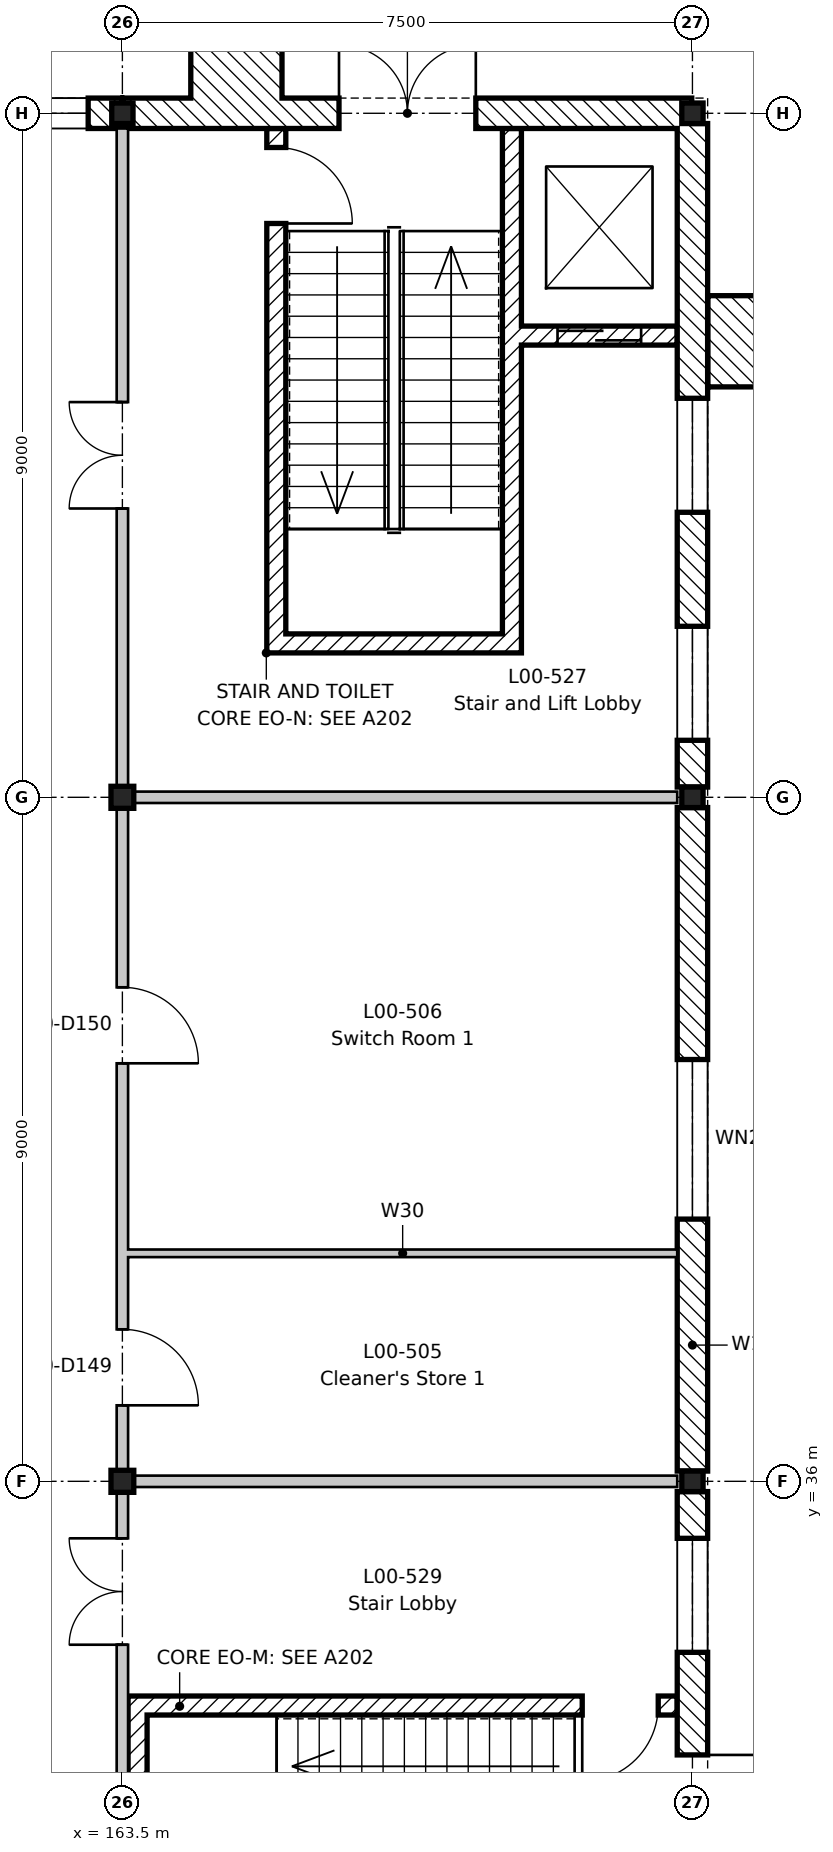
"""IFC4 building model, lengths in metres.
Left out: names, types, materials, properties, quantities, classifications, styles, units other than length and angle.
Written with IfcOpenShell. Run it as: python <this file> out.ifc"""

import sys

from ifc_helpers import new_model, si_unit, direction, frame, frame_2d, origin, origin_2d, place, context, subcontext, project, spatial, rectangle, i_section, extrude, element, fill, save


model = new_model("IFC4")
c1 = context("Model", 3, precision=1e-05, world=origin(), true_north=direction((0.0, 1.0)))
c2 = subcontext(c1, "Body", "Model", "MODEL_VIEW")
j1 = project(units=[si_unit("LENGTHUNIT", "METRE"), si_unit("PLANEANGLEUNIT", "RADIAN")], contexts=[c1])
p1 = place(None, origin())
s1 = spatial("IfcSite", under=j1, at=p1, CompositionType="ELEMENT")
p2 = place(p1, origin())
s2 = spatial("IfcBuilding", under=s1, at=p2, CompositionType="ELEMENT")
p3 = place(p2, origin())
s3 = spatial("IfcBuildingStorey", under=s2, at=p3, CompositionType="ELEMENT", Elevation=0.0)
for number, where, z_axis, x_axis in (
    (1, (163.5, 36.0, -0.6), (0.0, 0.0, 1.0), (1.0, 0.0, 0.0)),
    (2, (163.5, 45.0, -0.6), (0.0, 0.0, 1.0), (1.0, 0.0, 0.0)),
):
    element("IfcColumn", number, at=place(p3, frame(where, z_axis=z_axis, x_axis=x_axis)), inside=s3, PredefinedType="COLUMN", context=c2, shape_type="SweptSolid", body=[
        extrude(i_section(OverallWidth=0.3, OverallDepth=0.29, WebThickness=0.009, FlangeThickness=0.014, FilletRadius=0.027, at=origin_2d()), origin(), (0.0, 0.0, 1.0), 5.8),
    ])
for number, where, z_axis, x_axis in (
    (3, (163.5, 54.0, -0.6), (0.0, 0.0, 1.0), (1.0, 0.0, 0.0)),
    (4, (171.0, 36.0, -0.6), (0.0, 0.0, 1.0), (1.0, 0.0, 0.0)),
    (5, (171.0, 45.0, -0.6), (0.0, 0.0, 1.0), (1.0, 0.0, 0.0)),
    (6, (171.0, 54.0, -0.6), (0.0, 0.0, 1.0), (1.0, 0.0, 0.0)),
):
    element("IfcColumn", number, at=place(p3, frame(where, z_axis=z_axis, x_axis=x_axis)), inside=s3, PredefinedType="COLUMN", context=c2, shape_type="SweptSolid", body=[
        extrude(i_section(OverallWidth=0.28, OverallDepth=0.27, WebThickness=0.008, FlangeThickness=0.013, FilletRadius=0.024, at=origin_2d()), origin(), (0.0, 0.0, 1.0), 5.8),
    ])
p4 = place(p3, frame((168.625, 46.9, 0.0), z_axis=(0.0, 0.0, 1.0), x_axis=(0.0, 1.0, 0.0)))
e7 = element("IfcWall", 7, at=p4, inside=s3, PredefinedType="SHEAR", context=c2, shape_type="SweptSolid", body=[
    extrude(rectangle(XDim=6.9, YDim=0.25, at=frame_2d((3.45, 0.0))), origin(), (0.0, 0.0, 1.0), 5.2),
])
p5 = place(p3, frame((165.525, 46.9, 0.0), z_axis=(0.0, 0.0, 1.0), x_axis=(0.0, 1.0, 0.0)))
e8 = element("IfcWall", 8, at=p5, inside=s3, PredefinedType="SHEAR", context=c2, shape_type="SweptSolid", body=[
    extrude(rectangle(XDim=6.9, YDim=0.25, at=frame_2d((3.45, 0.0))), origin(), (0.0, 0.0, 1.0), 5.2),
])
p6 = place(p5, frame((5.65, 0.0, 0.0)))
e9 = element("IfcOpeningElement", 9, at=p6, cuts=e8, PredefinedType="OPENING", context=c2, shape_type="SweptSolid", body=[
    extrude(rectangle(XDim=1.0, YDim=2.1, at=frame_2d((0.5, 1.05))), frame((0.0, 0.135, 0.0), z_axis=(0.0, -1.0, 0.0), x_axis=(1.0, 0.0, 0.0)), (0.0, 0.0, 1.0), 0.27),
])
p7 = place(p3, frame((165.65, 47.025, 0.0), z_axis=(0.0, 0.0, 1.0), x_axis=(1.0, 0.0, 0.0)))
e10 = element("IfcWall", 10, at=p7, inside=s3, PredefinedType="SHEAR", context=c2, shape_type="SweptSolid", body=[
    extrude(rectangle(XDim=2.85, YDim=0.25, at=frame_2d((1.425, 0.0))), origin(), (0.0, 0.0, 1.0), 5.2),
])
p8 = place(p3, frame((168.75, 51.075, 0.0), z_axis=(0.0, 0.0, 1.0), x_axis=(1.0, 0.0, 0.0)))
e11 = element("IfcWall", 11, at=p8, inside=s3, PredefinedType="SHEAR", context=c2, shape_type="SweptSolid", body=[
    extrude(rectangle(XDim=2.05, YDim=0.25, at=frame_2d((1.025, 0.0))), origin(), (0.0, 0.0, 1.0), 5.2),
])
p9 = place(p8, frame((0.475, 0.0, 0.0)))
e12 = element("IfcOpeningElement", 12, at=p9, cuts=e11, PredefinedType="OPENING", context=c2, shape_type="SweptSolid", body=[
    extrude(rectangle(XDim=1.1, YDim=2.1, at=frame_2d((0.55, 1.05))), frame((0.0, 0.135, 0.0), z_axis=(0.0, -1.0, 0.0), x_axis=(1.0, 0.0, 0.0)), (0.0, 0.0, 1.0), 0.27),
])
p10 = place(p3, frame((168.625, 50.95, -1.5), z_axis=(0.0, 0.0, 1.0), x_axis=(0.0, 1.0, 0.0)))
e13 = element("IfcWall", 13, at=p10, inside=s3, PredefinedType="SHEAR", context=c2, shape_type="SweptSolid", body=[
    extrude(rectangle(XDim=2.85, YDim=0.25, at=frame_2d((1.425, 0.0))), origin(), (0.0, 0.0, 1.0), 1.5),
])
p11 = place(p3, frame((168.75, 51.075, -1.5), z_axis=(0.0, 0.0, 1.0), x_axis=(1.0, 0.0, 0.0)))
e14 = element("IfcWall", 14, at=p11, inside=s3, PredefinedType="SHEAR", context=c2, shape_type="SweptSolid", body=[
    extrude(rectangle(XDim=2.05, YDim=0.25, at=frame_2d((1.025, 0.0))), origin(), (0.0, 0.0, 1.0), 1.5),
])
p12 = place(p3, frame((163.575, 33.05, 0.0), z_axis=(0.0, 0.0, 1.0), x_axis=(1.0, 0.0, 0.0)))
e15 = element("IfcWall", 15, at=p12, inside=s3, PredefinedType="SHEAR", context=c2, shape_type="SweptSolid", body=[
    extrude(rectangle(XDim=7.225, YDim=0.25, at=frame_2d((3.613, 0.0))), origin(), (0.0, 0.0, 1.0), 5.2),
])
p13 = place(p12, frame((5.975, 0.0, 0.0)))
e16 = element("IfcOpeningElement", 16, at=p13, cuts=e15, PredefinedType="OPENING", context=c2, shape_type="SweptSolid", body=[
    extrude(rectangle(XDim=1.0, YDim=2.1, at=frame_2d((0.5, 1.05))), frame((0.0, 0.135, 0.0), z_axis=(0.0, -1.0, 0.0), x_axis=(1.0, 0.0, 0.0)), (0.0, 0.0, 1.0), 0.27),
])
p14 = place(p3, frame((163.7, 30.075, 0.0), z_axis=(0.0, 0.0, 1.0), x_axis=(0.0, 1.0, 0.0)))
e17 = element("IfcWall", 17, at=p14, inside=s3, PredefinedType="SHEAR", context=c2, shape_type="SweptSolid", body=[
    extrude(rectangle(XDim=2.85, YDim=0.25, at=frame_2d((1.425, 0.0))), origin(), (0.0, 0.0, 1.0), 5.2),
])
p15 = place(p3, frame((160.509, 54.0, 0.0), z_axis=(0.0, 0.0, 1.0), x_axis=(1.0, 0.0, 0.0)))
e18 = element("IfcWall", 18, at=p15, inside=s3, PredefinedType="STANDARD", context=c2, shape_type="SweptSolid", body=[
    extrude(rectangle(XDim=2.982, YDim=0.4, at=frame_2d((1.491, 0.0))), origin(), (0.0, 0.0, 1.0), 5.0),
])
p16 = place(p15, frame((0.441, 0.0, 0.9)))
e19 = element("IfcOpeningElement", 19, at=p16, cuts=e18, PredefinedType="OPENING", context=c2, shape_type="SweptSolid", body=[
    extrude(rectangle(XDim=2.1, YDim=2.1, at=frame_2d((1.05, 1.05))), frame((0.0, 0.21, 0.0), z_axis=(0.0, -1.0, 0.0), x_axis=(1.0, 0.0, 0.0)), (0.0, 0.0, 1.0), 0.42),
])
p17 = place(p3, frame((163.509, 54.0, 0.0), z_axis=(0.0, 0.0, 1.0), x_axis=(1.0, 0.0, 0.0)))
e20 = element("IfcWall", 20, at=p17, inside=s3, PredefinedType="STANDARD", context=c2, shape_type="SweptSolid", body=[
    extrude(rectangle(XDim=7.482, YDim=0.4, at=frame_2d((3.741, 0.0))), origin(), (0.0, 0.0, 1.0), 4.87),
])
p18 = place(p17, frame((2.841, 0.0, 0.0)))
e21 = element("IfcOpeningElement", 21, at=p18, cuts=e20, PredefinedType="OPENING", context=c2, shape_type="SweptSolid", body=[
    extrude(rectangle(XDim=1.8, YDim=2.1, at=frame_2d((0.9, 1.05))), frame((0.0, 0.21, 0.0), z_axis=(0.0, -1.0, 0.0), x_axis=(1.0, 0.0, 0.0)), (0.0, 0.0, 1.0), 0.42),
])
p19 = place(p3, frame((171.0, 35.865, 0.0), z_axis=(0.0, 0.0, 1.0), x_axis=(0.0, -1.0, 0.0)))
e22 = element("IfcWall", 22, at=p19, inside=s3, PredefinedType="STANDARD", context=c2, shape_type="SweptSolid", body=[
    extrude(rectangle(XDim=8.73, YDim=0.4, at=frame_2d((4.365, 0.0))), origin(), (0.0, 0.0, 1.0), 4.8),
])
p20 = place(p19, frame((3.465, 0.0, 0.0)))
e23 = element("IfcOpeningElement", 23, at=p20, cuts=e22, PredefinedType="OPENING", context=c2, shape_type="SweptSolid", body=[
    extrude(rectangle(XDim=1.8, YDim=2.1, at=frame_2d((0.9, 1.05))), frame((0.0, 0.21, 0.0), z_axis=(0.0, -1.0, 0.0), x_axis=(1.0, 0.0, 0.0)), (0.0, 0.0, 1.0), 0.42),
])
p21 = place(p19, frame((0.615, 0.0, 0.3)))
e24 = element("IfcOpeningElement", 24, at=p21, cuts=e22, PredefinedType="OPENING", context=c2, shape_type="SweptSolid", body=[
    extrude(rectangle(XDim=1.5, YDim=3.3, at=frame_2d((0.75, 1.65))), frame((0.0, 0.21, 0.0), z_axis=(0.0, -1.0, 0.0), x_axis=(1.0, 0.0, 0.0)), (0.0, 0.0, 1.0), 0.42),
])
p22 = place(p3, frame((171.0, 44.865, 0.0), z_axis=(0.0, 0.0, 1.0), x_axis=(0.0, -1.0, 0.0)))
e25 = element("IfcWall", 25, at=p22, inside=s3, PredefinedType="STANDARD", context=c2, shape_type="SweptSolid", body=[
    extrude(rectangle(XDim=8.73, YDim=0.4, at=frame_2d((4.365, 0.0))), origin(), (0.0, 0.0, 1.0), 4.8),
])
p23 = place(p22, frame((3.315, 0.0, 0.9)))
e26 = element("IfcOpeningElement", 26, at=p23, cuts=e25, PredefinedType="OPENING", context=c2, shape_type="SweptSolid", body=[
    extrude(rectangle(XDim=2.1, YDim=2.1, at=frame_2d((1.05, 1.05))), frame((0.0, 0.21, 0.0), z_axis=(0.0, -1.0, 0.0), x_axis=(1.0, 0.0, 0.0)), (0.0, 0.0, 1.0), 0.42),
])
p24 = place(p3, frame((171.0, 53.865, 0.0), z_axis=(0.0, 0.0, 1.0), x_axis=(0.0, -1.0, 0.0)))
e27 = element("IfcWall", 27, at=p24, inside=s3, PredefinedType="STANDARD", context=c2, shape_type="SweptSolid", body=[
    extrude(rectangle(XDim=8.73, YDim=0.4, at=frame_2d((4.365, 0.0))), origin(), (0.0, 0.0, 1.0), 4.8),
])
p25 = place(p24, frame((6.615, 0.0, 0.3)))
e28 = element("IfcOpeningElement", 28, at=p25, cuts=e27, PredefinedType="OPENING", context=c2, shape_type="SweptSolid", body=[
    extrude(rectangle(XDim=1.5, YDim=3.3, at=frame_2d((0.75, 1.65))), frame((0.0, 0.21, 0.0), z_axis=(0.0, -1.0, 0.0), x_axis=(1.0, 0.0, 0.0)), (0.0, 0.0, 1.0), 0.42),
])
p26 = place(p24, frame((3.615, 0.0, 0.3)))
e29 = element("IfcOpeningElement", 29, at=p26, cuts=e27, PredefinedType="OPENING", context=c2, shape_type="SweptSolid", body=[
    extrude(rectangle(XDim=1.5, YDim=3.3, at=frame_2d((0.75, 1.65))), frame((0.0, 0.21, 0.0), z_axis=(0.0, -1.0, 0.0), x_axis=(1.0, 0.0, 0.0)), (0.0, 0.0, 1.0), 0.42),
])
for number, where, z_axis, x_axis in (
    (30, (164.4, 54.8, 0.0), (0.0, 0.0, 1.0), (1.0, 0.0, 0.0)),
    (31, (171.8, 50.4, 0.0), (0.0, 0.0, 1.0), (0.0, 1.0, 0.0)),
):
    element("IfcWall", number, at=place(p3, frame(where, z_axis=z_axis, x_axis=x_axis)), inside=s3, PredefinedType="STANDARD", context=c2, shape_type="SweptSolid", body=[
        extrude(rectangle(XDim=1.2, YDim=1.2, at=frame_2d((0.6, 0.0))), origin(), (0.0, 0.0, 1.0), 5.4),
    ])
p27 = place(p3, frame((163.575, 36.0, 0.0), z_axis=(0.0, 0.0, 1.0), x_axis=(1.0, 0.0, 0.0)))
e32 = element("IfcWall", 32, at=p27, inside=s3, PredefinedType="PARTITIONING", context=c2, shape_type="SweptSolid", body=[
    extrude(rectangle(XDim=7.225, YDim=0.15, at=frame_2d((3.613, 0.0))), origin(), (0.0, 0.0, 1.0), 4.85),
])
p28 = place(p3, frame((163.575, 39.0, 0.0), z_axis=(0.0, 0.0, 1.0), x_axis=(1.0, 0.0, 0.0)))
e33 = element("IfcWall", 33, at=p28, inside=s3, PredefinedType="PARTITIONING", context=c2, shape_type="SweptSolid", body=[
    extrude(rectangle(XDim=7.225, YDim=0.1, at=frame_2d((3.613, 0.0))), origin(), (0.0, 0.0, 1.0), 5.2),
])
p29 = place(p3, frame((163.575, 45.0, 0.0), z_axis=(0.0, 0.0, 1.0), x_axis=(1.0, 0.0, 0.0)))
e34 = element("IfcWall", 34, at=p29, inside=s3, PredefinedType="PARTITIONING", context=c2, shape_type="SweptSolid", body=[
    extrude(rectangle(XDim=7.225, YDim=0.15, at=frame_2d((3.613, 0.0))), origin(), (0.0, 0.0, 1.0), 4.85),
])
p30 = place(p3, frame((163.5, -8.8, 0.0), z_axis=(0.0, 0.0, 1.0), x_axis=(0.0, 1.0, 0.0)))
e35 = element("IfcWall", 35, at=p30, inside=s3, PredefinedType="PARTITIONING", context=c2, shape_type="SweptSolid", body=[
    extrude(rectangle(XDim=62.6, YDim=0.15, at=frame_2d((31.3, 0.0))), origin(), (0.0, 0.0, 1.0), 4.68),
])
p31 = place(p30, frame((20.3, 0.0, 0.0)))
e36 = element("IfcOpeningElement", 36, at=p31, cuts=e35, PredefinedType="OPENING", context=c2, shape_type="SweptSolid", body=[
    extrude(rectangle(XDim=1.0, YDim=2.1, at=frame_2d((0.5, 1.05))), frame((0.0, 0.085, 0.0), z_axis=(0.0, -1.0, 0.0), x_axis=(1.0, 0.0, 0.0)), (0.0, 0.0, 1.0), 0.17),
])
p32 = place(p30, frame((24.8, 0.0, 0.0)))
e37 = element("IfcOpeningElement", 37, at=p32, cuts=e35, PredefinedType="OPENING", context=c2, shape_type="SweptSolid", body=[
    extrude(rectangle(XDim=1.0, YDim=2.1, at=frame_2d((0.5, 1.05))), frame((0.0, 0.085, 0.0), z_axis=(0.0, -1.0, 0.0), x_axis=(1.0, 0.0, 0.0)), (0.0, 0.0, 1.0), 0.17),
])
p33 = place(p30, frame((27.8, 0.0, 0.0)))
e38 = element("IfcOpeningElement", 38, at=p33, cuts=e35, PredefinedType="OPENING", context=c2, shape_type="SweptSolid", body=[
    extrude(rectangle(XDim=1.0, YDim=2.1, at=frame_2d((0.5, 1.05))), frame((0.0, 0.085, 0.0), z_axis=(0.0, -1.0, 0.0), x_axis=(1.0, 0.0, 0.0)), (0.0, 0.0, 1.0), 0.17),
])
p34 = place(p30, frame((32.3, 0.0, 0.0)))
e39 = element("IfcOpeningElement", 39, at=p34, cuts=e35, PredefinedType="OPENING", context=c2, shape_type="SweptSolid", body=[
    extrude(rectangle(XDim=1.0, YDim=2.1, at=frame_2d((0.5, 1.05))), frame((0.0, 0.085, 0.0), z_axis=(0.0, -1.0, 0.0), x_axis=(1.0, 0.0, 0.0)), (0.0, 0.0, 1.0), 0.17),
])
p35 = place(p30, frame((45.8, 0.0, 0.0)))
e40 = element("IfcOpeningElement", 40, at=p35, cuts=e35, PredefinedType="OPENING", context=c2, shape_type="SweptSolid", body=[
    extrude(rectangle(XDim=1.0, YDim=2.1, at=frame_2d((0.5, 1.05))), frame((0.0, 0.085, 0.0), z_axis=(0.0, -1.0, 0.0), x_axis=(1.0, 0.0, 0.0)), (0.0, 0.0, 1.0), 0.17),
])
p36 = place(p30, frame((50.3, 0.0, 0.0)))
e41 = element("IfcOpeningElement", 41, at=p36, cuts=e35, PredefinedType="OPENING", context=c2, shape_type="SweptSolid", body=[
    extrude(rectangle(XDim=1.0, YDim=2.1, at=frame_2d((0.5, 1.05))), frame((0.0, 0.085, 0.0), z_axis=(0.0, -1.0, 0.0), x_axis=(1.0, 0.0, 0.0)), (0.0, 0.0, 1.0), 0.17),
])
p37 = place(p30, frame((12.6, 0.0, 0.0)))
e42 = element("IfcOpeningElement", 42, at=p37, cuts=e35, PredefinedType="OPENING", context=c2, shape_type="SweptSolid", body=[
    extrude(rectangle(XDim=1.4, YDim=2.1, at=frame_2d((0.7, 1.05))), frame((0.0, 0.085, 0.0), z_axis=(0.0, -1.0, 0.0), x_axis=(1.0, 0.0, 0.0)), (0.0, 0.0, 1.0), 0.17),
])
p38 = place(p30, frame((3.6, 0.0, 0.0)))
e43 = element("IfcOpeningElement", 43, at=p38, cuts=e35, PredefinedType="OPENING", context=c2, shape_type="SweptSolid", body=[
    extrude(rectangle(XDim=1.4, YDim=2.1, at=frame_2d((0.7, 1.05))), frame((0.0, 0.085, 0.0), z_axis=(0.0, -1.0, 0.0), x_axis=(1.0, 0.0, 0.0)), (0.0, 0.0, 1.0), 0.17),
])
p39 = place(p30, frame((57.6, 0.0, 0.0)))
e44 = element("IfcOpeningElement", 44, at=p39, cuts=e35, PredefinedType="OPENING", context=c2, shape_type="SweptSolid", body=[
    extrude(rectangle(XDim=1.4, YDim=2.1, at=frame_2d((0.7, 1.05))), frame((0.0, 0.085, 0.0), z_axis=(0.0, -1.0, 0.0), x_axis=(1.0, 0.0, 0.0)), (0.0, 0.0, 1.0), 0.17),
])
p40 = place(p30, frame((36.75, 0.0, 0.0)))
e45 = element("IfcOpeningElement", 45, at=p40, cuts=e35, PredefinedType="OPENING", context=c2, shape_type="SweptSolid", body=[
    extrude(rectangle(XDim=1.0, YDim=2.1, at=frame_2d((0.5, 1.05))), frame((0.0, 0.085, 0.0), z_axis=(0.0, -1.0, 0.0), x_axis=(1.0, 0.0, 0.0)), (0.0, 0.0, 1.0), 0.17),
])
p41 = place(p30, frame((42.65, 0.0, 0.0)))
e46 = element("IfcOpeningElement", 46, at=p41, cuts=e35, PredefinedType="OPENING", context=c2, shape_type="SweptSolid", body=[
    extrude(rectangle(XDim=1.4, YDim=2.1, at=frame_2d((0.7, 1.05))), frame((0.0, 0.085, 0.0), z_axis=(0.0, -1.0, 0.0), x_axis=(1.0, 0.0, 0.0)), (0.0, 0.0, 1.0), 0.17),
])
p42 = place(p16, origin())
e47 = element("IfcWindow", 47, at=p42, inside=s3, PartitioningType="SINGLE_PANEL", PredefinedType="WINDOW", context=c2, shape_type="SweptSolid", body=[
    extrude(rectangle(XDim=2.1, YDim=2.1, at=frame_2d((1.05, 1.05))), frame((0.0, -0.12, 0.0), z_axis=(0.0, -1.0, 0.0), x_axis=(1.0, 0.0, 0.0)), (0.0, 0.0, 1.0), 0.06),
])
fill(e19, e47)
p43 = place(p18, origin())
e48 = element("IfcDoor", 48, at=p43, inside=s3, OperationType="DOUBLE_DOOR_SINGLE_SWING", PredefinedType="DOOR", context=c2, shape_type="SweptSolid", body=[
    extrude(rectangle(XDim=1.8, YDim=2.1, at=frame_2d((0.9, 1.05))), frame((0.0, 0.025, 0.0), z_axis=(0.0, -1.0, 0.0), x_axis=(1.0, 0.0, 0.0)), (0.0, 0.0, 1.0), 0.05),
])
fill(e21, e48)
p44 = place(p20, origin())
e49 = element("IfcDoor", 49, at=p44, inside=s3, OperationType="DOUBLE_DOOR_SINGLE_SWING", PredefinedType="DOOR", context=c2, shape_type="SweptSolid", body=[
    extrude(rectangle(XDim=1.8, YDim=2.1, at=frame_2d((0.9, 1.05))), frame((0.0, 0.025, 0.0), z_axis=(0.0, -1.0, 0.0), x_axis=(1.0, 0.0, 0.0)), (0.0, 0.0, 1.0), 0.05),
])
fill(e23, e49)
p45 = place(p21, origin())
e50 = element("IfcWindow", 50, at=p45, inside=s3, PartitioningType="SINGLE_PANEL", PredefinedType="WINDOW", context=c2, shape_type="SweptSolid", body=[
    extrude(rectangle(XDim=1.5, YDim=3.3, at=frame_2d((0.75, 1.65))), frame((0.0, -0.12, 0.0), z_axis=(0.0, -1.0, 0.0), x_axis=(1.0, 0.0, 0.0)), (0.0, 0.0, 1.0), 0.06),
])
fill(e24, e50)
p46 = place(p23, origin())
e51 = element("IfcWindow", 51, at=p46, inside=s3, PartitioningType="SINGLE_PANEL", PredefinedType="WINDOW", context=c2, shape_type="SweptSolid", body=[
    extrude(rectangle(XDim=2.1, YDim=2.1, at=frame_2d((1.05, 1.05))), frame((0.0, -0.12, 0.0), z_axis=(0.0, -1.0, 0.0), x_axis=(1.0, 0.0, 0.0)), (0.0, 0.0, 1.0), 0.06),
])
fill(e26, e51)
p47 = place(p25, origin())
e52 = element("IfcWindow", 52, at=p47, inside=s3, PartitioningType="SINGLE_PANEL", PredefinedType="WINDOW", context=c2, shape_type="SweptSolid", body=[
    extrude(rectangle(XDim=1.5, YDim=3.3, at=frame_2d((0.75, 1.65))), frame((0.0, -0.12, 0.0), z_axis=(0.0, -1.0, 0.0), x_axis=(1.0, 0.0, 0.0)), (0.0, 0.0, 1.0), 0.06),
])
fill(e28, e52)
p48 = place(p26, origin())
e53 = element("IfcWindow", 53, at=p48, inside=s3, PartitioningType="SINGLE_PANEL", PredefinedType="WINDOW", context=c2, shape_type="SweptSolid", body=[
    extrude(rectangle(XDim=1.5, YDim=3.3, at=frame_2d((0.75, 1.65))), frame((0.0, -0.12, 0.0), z_axis=(0.0, -1.0, 0.0), x_axis=(1.0, 0.0, 0.0)), (0.0, 0.0, 1.0), 0.06),
])
fill(e29, e53)
p49 = place(p35, frame((1.0, 0.0, 0.0), z_axis=(0.0, 0.0, 1.0), x_axis=(-1.0, 0.0, 0.0)))
e54 = element("IfcDoor", 54, at=p49, inside=s3, OperationType="SINGLE_SWING_RIGHT", PredefinedType="DOOR", context=c2, shape_type="SweptSolid", body=[
    extrude(rectangle(XDim=1.0, YDim=2.1, at=frame_2d((0.5, 1.05))), frame((0.0, 0.025, 0.0), z_axis=(0.0, -1.0, 0.0), x_axis=(1.0, 0.0, 0.0)), (0.0, 0.0, 1.0), 0.05),
])
fill(e40, e54)
p50 = place(p36, frame((1.0, 0.0, 0.0), z_axis=(0.0, 0.0, 1.0), x_axis=(-1.0, 0.0, 0.0)))
e55 = element("IfcDoor", 55, at=p50, inside=s3, OperationType="SINGLE_SWING_RIGHT", PredefinedType="DOOR", context=c2, shape_type="SweptSolid", body=[
    extrude(rectangle(XDim=1.0, YDim=2.1, at=frame_2d((0.5, 1.05))), frame((0.0, 0.025, 0.0), z_axis=(0.0, -1.0, 0.0), x_axis=(1.0, 0.0, 0.0)), (0.0, 0.0, 1.0), 0.05),
])
fill(e41, e55)
p51 = place(p6, frame((1.0, 0.0, 0.0), z_axis=(0.0, 0.0, 1.0), x_axis=(-1.0, 0.0, 0.0)))
e56 = element("IfcDoor", 56, at=p51, inside=s3, OperationType="SINGLE_SWING_RIGHT", PredefinedType="DOOR", context=c2, shape_type="SweptSolid", body=[
    extrude(rectangle(XDim=1.0, YDim=2.1, at=frame_2d((0.5, 1.05))), frame((0.0, 0.025, 0.0), z_axis=(0.0, -1.0, 0.0), x_axis=(1.0, 0.0, 0.0)), (0.0, 0.0, 1.0), 0.05),
])
fill(e9, e56)
p52 = place(p39, origin())
e57 = element("IfcDoor", 57, at=p52, inside=s3, OperationType="DOUBLE_DOOR_SINGLE_SWING", PredefinedType="DOOR", context=c2, shape_type="SweptSolid", body=[
    extrude(rectangle(XDim=1.4, YDim=2.1, at=frame_2d((0.7, 1.05))), frame((0.0, 0.025, 0.0), z_axis=(0.0, -1.0, 0.0), x_axis=(1.0, 0.0, 0.0)), (0.0, 0.0, 1.0), 0.05),
])
fill(e44, e57)
p53 = place(p13, frame((1.0, 0.0, 0.0), z_axis=(0.0, 0.0, 1.0), x_axis=(-1.0, 0.0, 0.0)))
e58 = element("IfcDoor", 58, at=p53, inside=s3, OperationType="SINGLE_SWING_RIGHT", PredefinedType="DOOR", context=c2, shape_type="SweptSolid", body=[
    extrude(rectangle(XDim=1.0, YDim=2.1, at=frame_2d((0.5, 1.05))), frame((0.0, 0.025, 0.0), z_axis=(0.0, -1.0, 0.0), x_axis=(1.0, 0.0, 0.0)), (0.0, 0.0, 1.0), 0.05),
])
fill(e16, e58)
p54 = place(p41, origin())
e59 = element("IfcDoor", 59, at=p54, inside=s3, OperationType="DOUBLE_DOOR_SINGLE_SWING", PredefinedType="DOOR", context=c2, shape_type="SweptSolid", body=[
    extrude(rectangle(XDim=1.4, YDim=2.1, at=frame_2d((0.7, 1.05))), frame((0.0, 0.025, 0.0), z_axis=(0.0, -1.0, 0.0), x_axis=(1.0, 0.0, 0.0)), (0.0, 0.0, 1.0), 0.05),
])
fill(e46, e59)
p55 = place(p9, origin())
e60 = element("IfcDoor", 60, at=p55, inside=s3, OperationType="SLIDING_TO_LEFT", PredefinedType="DOOR", context=c2, shape_type="SweptSolid", body=[
    extrude(rectangle(XDim=1.1, YDim=2.1, at=frame_2d((0.55, 1.05))), frame((0.0, 0.025, 0.0), z_axis=(0.0, -1.0, 0.0), x_axis=(1.0, 0.0, 0.0)), (0.0, 0.0, 1.0), 0.05),
])
fill(e12, e60)
save(model, sys.argv[1])
